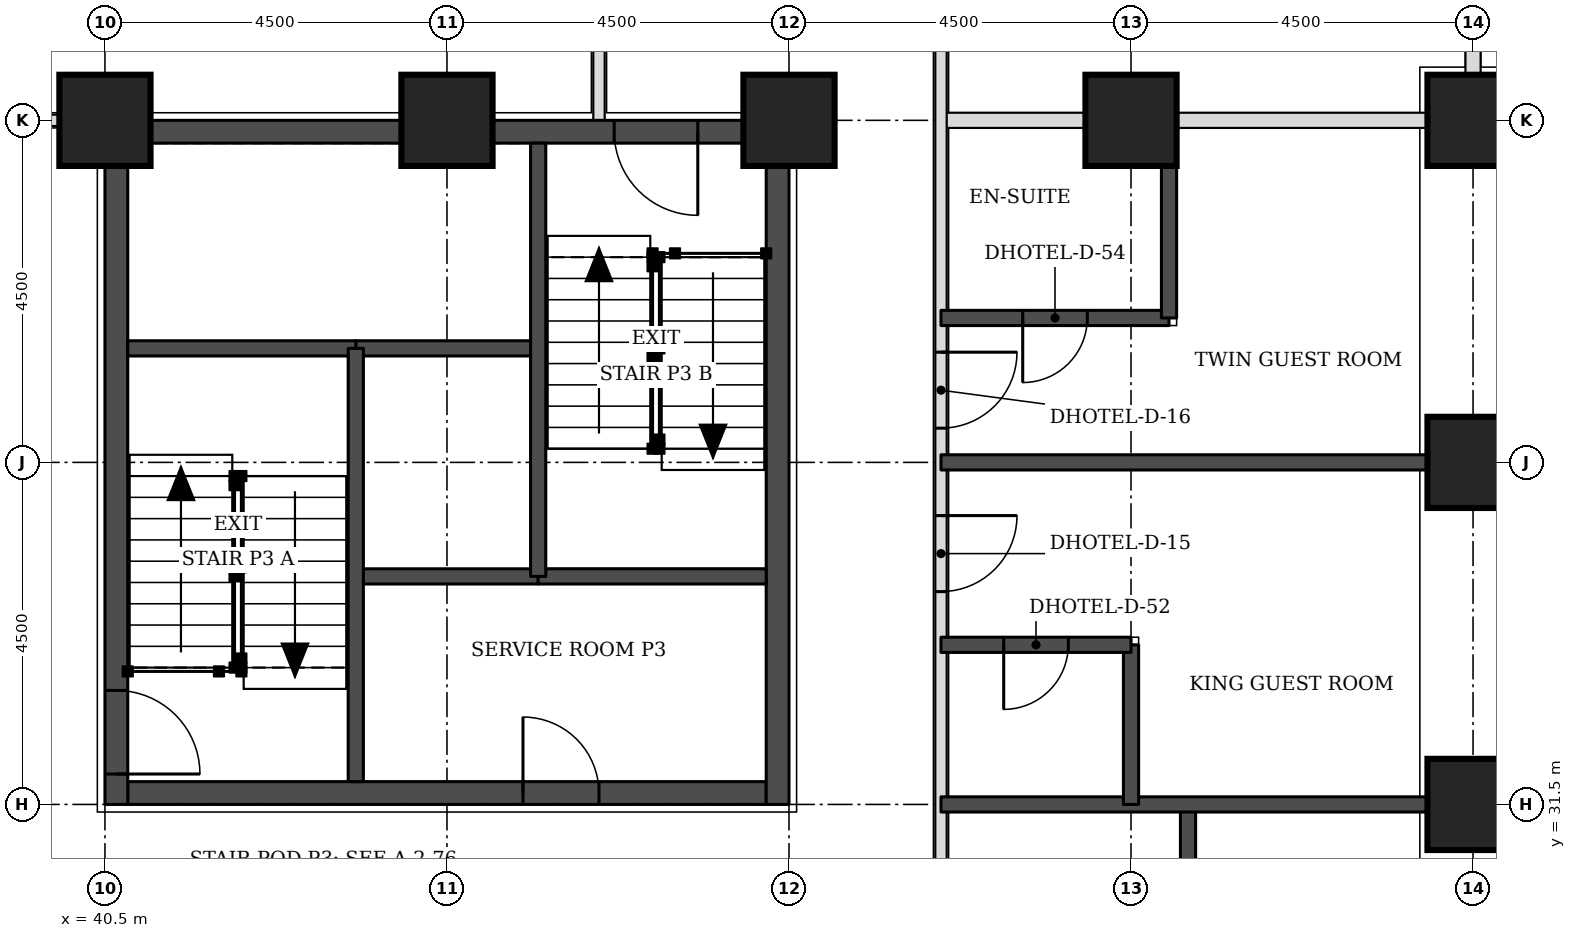
"""IFC4 building model, lengths in metres.
Left out: names, types, materials, properties, quantities, classifications, styles, units other than length and angle.
Written with IfcOpenShell. Run it as: python <this file> out.ifc"""

import sys

from ifc_helpers import new_model, si_unit, direction, frame, frame_2d, origin, origin_2d, place, context, subcontext, project, spatial, rectangle, extrude, element, fill, save


model = new_model("IFC4")
c1 = context("Model", 3, precision=1e-05, world=origin(), true_north=direction((0.0, 1.0)))
c2 = subcontext(c1, "Body", "Model", "MODEL_VIEW")
j1 = project(units=[si_unit("LENGTHUNIT", "METRE"), si_unit("PLANEANGLEUNIT", "RADIAN")], contexts=[c1])
p1 = place(None, origin())
s1 = spatial("IfcSite", under=j1, at=p1, CompositionType="ELEMENT")
p2 = place(p1, origin())
s2 = spatial("IfcBuilding", under=s1, at=p2, CompositionType="ELEMENT")
p3 = place(p2, frame((0.0, 0.0, 36.3)))
s3 = spatial("IfcBuildingStorey", under=s2, at=p3, CompositionType="ELEMENT", Elevation=36.3)
for number, where, z_axis, x_axis in (
    (1, (58.5, 31.5, 0.0), (0.0, 0.0, 1.0), (1.0, 0.0, 0.0)),
    (2, (58.5, 36.0, 0.0), (0.0, 0.0, 1.0), (1.0, 0.0, 0.0)),
    (3, (40.5, 40.5, 0.0), (0.0, 0.0, 1.0), (1.0, 0.0, 0.0)),
    (4, (45.0, 40.5, 0.0), (0.0, 0.0, 1.0), (1.0, 0.0, 0.0)),
    (5, (49.5, 40.5, 0.0), (0.0, 0.0, 1.0), (1.0, 0.0, 0.0)),
    (6, (54.0, 40.5, 0.0), (0.0, 0.0, 1.0), (1.0, 0.0, 0.0)),
    (7, (58.5, 40.5, 0.0), (0.0, 0.0, 1.0), (1.0, 0.0, 0.0)),
):
    element("IfcColumn", number, at=place(p3, frame(where, z_axis=z_axis, x_axis=x_axis)), inside=s3, PredefinedType="COLUMN", context=c2, shape_type="SweptSolid", body=[
        extrude(rectangle(XDim=1.2, YDim=1.2, at=origin_2d()), origin(), (0.0, 0.0, 1.0), 3.3),
    ])
p4 = place(p3, frame((40.8, 31.65, 0.0), z_axis=(0.0, 0.0, 1.0), x_axis=(1.0, 0.0, 0.0)))
e8 = element("IfcWall", 8, at=p4, inside=s3, PredefinedType="SHEAR", context=c2, shape_type="SweptSolid", body=[
    extrude(rectangle(XDim=8.4, YDim=0.3, at=frame_2d((4.2, 0.0))), origin(), (0.0, 0.0, 1.0), 3.3),
])
p5 = place(p4, frame((5.2, 0.0, 0.0)))
e9 = element("IfcOpeningElement", 9, at=p5, cuts=e8, PredefinedType="OPENING", context=c2, shape_type="SweptSolid", body=[
    extrude(rectangle(XDim=1.0, YDim=2.1, at=frame_2d((0.5, 1.05))), frame((0.0, 0.16, 0.0), z_axis=(0.0, -1.0, 0.0), x_axis=(1.0, 0.0, 0.0)), (0.0, 0.0, 1.0), 0.32),
])
p6 = place(p3, frame((40.8, 40.35, 0.0), z_axis=(0.0, 0.0, 1.0), x_axis=(1.0, 0.0, 0.0)))
e10 = element("IfcWall", 10, at=p6, inside=s3, PredefinedType="SHEAR", context=c2, shape_type="SweptSolid", body=[
    extrude(rectangle(XDim=8.4, YDim=0.3, at=frame_2d((4.2, 0.0))), origin(), (0.0, 0.0, 1.0), 3.3),
])
p7 = place(p6, frame((6.4, 0.0, 0.0)))
e11 = element("IfcOpeningElement", 11, at=p7, cuts=e10, PredefinedType="OPENING", context=c2, shape_type="SweptSolid", body=[
    extrude(rectangle(XDim=1.1, YDim=2.1, at=frame_2d((0.55, 1.05))), frame((0.0, 0.16, 0.0), z_axis=(0.0, -1.0, 0.0), x_axis=(1.0, 0.0, 0.0)), (0.0, 0.0, 1.0), 0.32),
])
p8 = place(p3, frame((40.65, 31.5, 0.0), z_axis=(0.0, 0.0, 1.0), x_axis=(0.0, 1.0, 0.0)))
e12 = element("IfcWall", 12, at=p8, inside=s3, PredefinedType="SHEAR", context=c2, shape_type="SweptSolid", body=[
    extrude(rectangle(XDim=9.0, YDim=0.3, at=frame_2d((4.5, 0.0))), origin(), (0.0, 0.0, 1.0), 3.3),
])
p9 = place(p8, frame((0.4, 0.0, 0.0)))
e13 = element("IfcOpeningElement", 13, at=p9, cuts=e12, PredefinedType="OPENING", context=c2, shape_type="SweptSolid", body=[
    extrude(rectangle(XDim=1.1, YDim=2.1, at=frame_2d((0.55, 1.05))), frame((0.0, 0.16, 0.0), z_axis=(0.0, -1.0, 0.0), x_axis=(1.0, 0.0, 0.0)), (0.0, 0.0, 1.0), 0.32),
])
p10 = place(p3, frame((49.35, 31.5, 0.0), z_axis=(0.0, 0.0, 1.0), x_axis=(0.0, 1.0, 0.0)))
e14 = element("IfcWall", 14, at=p10, inside=s3, PredefinedType="SHEAR", context=c2, shape_type="SweptSolid", body=[
    extrude(rectangle(XDim=9.0, YDim=0.3, at=frame_2d((4.5, 0.0))), origin(), (0.0, 0.0, 1.0), 3.3),
])
p11 = place(p3, frame((51.5, 40.5, 0.0), z_axis=(0.0, 0.0, 1.0), x_axis=(1.0, 0.0, 0.0)))
e15 = element("IfcWall", 15, at=p11, inside=s3, PredefinedType="PARTITIONING", context=c2, shape_type="SweptSolid", body=[
    extrude(rectangle(XDim=6.4, YDim=0.2, at=frame_2d((3.2, 0.0))), origin(), (0.0, 0.0, 1.0), 2.33),
])
p12 = place(p3, frame((58.5, 41.1, 0.0), z_axis=(0.0, 0.0, 1.0), x_axis=(0.0, 1.0, 0.0)))
e16 = element("IfcWall", 16, at=p12, inside=s3, PredefinedType="PARTITIONING", context=c2, shape_type="SweptSolid", body=[
    extrude(rectangle(XDim=6.4, YDim=0.2, at=frame_2d((3.2, 0.0))), origin(), (0.0, 0.0, 1.0), 3.08),
])
p13 = place(p3, frame((51.5, 25.15, 0.0), z_axis=(0.0, 0.0, 1.0), x_axis=(0.0, 1.0, 0.0)))
e17 = element("IfcWall", 17, at=p13, inside=s3, PredefinedType="PARTITIONING", context=c2, shape_type="SweptSolid", body=[
    extrude(rectangle(XDim=22.35, YDim=0.15, at=frame_2d((11.175, 0.0))), origin(), (0.0, 0.0, 1.0), 3.08),
])
p14 = place(p13, frame((0.347, 0.0, 0.0)))
e18 = element("IfcOpeningElement", 18, at=p14, cuts=e17, PredefinedType="OPENING", context=c2, shape_type="SweptSolid", body=[
    extrude(rectangle(XDim=1.0, YDim=2.1, at=frame_2d((0.5, 1.05))), frame((0.0, 0.085, 0.0), z_axis=(0.0, -1.0, 0.0), x_axis=(1.0, 0.0, 0.0)), (0.0, 0.0, 1.0), 0.17),
])
p15 = place(p13, frame((2.3, 0.0, 0.0)))
e19 = element("IfcOpeningElement", 19, at=p15, cuts=e17, PredefinedType="OPENING", context=c2, shape_type="SweptSolid", body=[
    extrude(rectangle(XDim=1.0, YDim=2.1, at=frame_2d((0.5, 1.05))), frame((0.0, 0.085, 0.0), z_axis=(0.0, -1.0, 0.0), x_axis=(1.0, 0.0, 0.0)), (0.0, 0.0, 1.0), 0.17),
])
p16 = place(p13, frame((9.15, 0.0, 0.0)))
e20 = element("IfcOpeningElement", 20, at=p16, cuts=e17, PredefinedType="OPENING", context=c2, shape_type="SweptSolid", body=[
    extrude(rectangle(XDim=1.0, YDim=2.1, at=frame_2d((0.5, 1.05))), frame((0.0, 0.085, 0.0), z_axis=(0.0, -1.0, 0.0), x_axis=(1.0, 0.0, 0.0)), (0.0, 0.0, 1.0), 0.17),
])
p17 = place(p13, frame((11.3, 0.0, 0.0)))
e21 = element("IfcOpeningElement", 21, at=p17, cuts=e17, PredefinedType="OPENING", context=c2, shape_type="SweptSolid", body=[
    extrude(rectangle(XDim=1.0, YDim=2.1, at=frame_2d((0.5, 1.05))), frame((0.0, 0.085, 0.0), z_axis=(0.0, -1.0, 0.0), x_axis=(1.0, 0.0, 0.0)), (0.0, 0.0, 1.0), 0.17),
])
p18 = place(p13, frame((18.4, 0.0, 0.0)))
e22 = element("IfcOpeningElement", 22, at=p18, cuts=e17, PredefinedType="OPENING", context=c2, shape_type="SweptSolid", body=[
    extrude(rectangle(XDim=0.9, YDim=2.1, at=frame_2d((0.45, 1.05))), frame((0.0, 0.085, 0.0), z_axis=(0.0, -1.0, 0.0), x_axis=(1.0, 0.0, 0.0)), (0.0, 0.0, 1.0), 0.17),
])
p19 = place(p3, frame((38.5, 40.5, 0.0), z_axis=(0.0, 0.0, 1.0), x_axis=(1.0, 0.0, 0.0)))
e23 = element("IfcWall", 23, at=p19, inside=s3, PredefinedType="PARTITIONING", context=c2, shape_type="SweptSolid", body=[
    extrude(rectangle(XDim=1.95, YDim=0.15, at=frame_2d((0.975, 0.0))), origin(), (0.0, 0.0, 1.0), 2.33),
])
p20 = place(p3, frame((47.0, 40.5, 0.0), z_axis=(0.0, 0.0, 1.0), x_axis=(0.0, 1.0, 0.0)))
e24 = element("IfcWall", 24, at=p20, inside=s3, PredefinedType="PARTITIONING", context=c2, shape_type="SweptSolid", body=[
    extrude(rectangle(XDim=7.0, YDim=0.15, at=frame_2d((3.5, 0.0))), origin(), (0.0, 0.0, 1.0), 3.08),
])
p21 = place(p20, frame((3.05, 0.0, 0.0)))
e25 = element("IfcOpeningElement", 25, at=p21, cuts=e24, PredefinedType="OPENING", context=c2, shape_type="SweptSolid", body=[
    extrude(rectangle(XDim=0.9, YDim=2.1, at=frame_2d((0.45, 1.05))), frame((0.0, 0.085, 0.0), z_axis=(0.0, -1.0, 0.0), x_axis=(1.0, 0.0, 0.0)), (0.0, 0.0, 1.0), 0.17),
])
p22 = place(p3, frame((54.75, 28.9, 0.0), z_axis=(0.0, 0.0, 1.0), x_axis=(0.0, 1.0, 0.0)))
e26 = element("IfcWall", 26, at=p22, inside=s3, PredefinedType="SOLIDWALL", context=c2, shape_type="SweptSolid", body=[
    extrude(rectangle(XDim=2.6, YDim=0.2, at=frame_2d((1.3, 0.0))), origin(), (0.0, 0.0, 1.0), 3.08),
])
p23 = place(p3, frame((51.5, 31.5, 0.0), z_axis=(0.0, 0.0, 1.0), x_axis=(1.0, 0.0, 0.0)))
e27 = element("IfcWall", 27, at=p23, inside=s3, PredefinedType="SOLIDWALL", context=c2, shape_type="SweptSolid", body=[
    extrude(rectangle(XDim=6.4, YDim=0.2, at=frame_2d((3.2, 0.0))), origin(), (0.0, 0.0, 1.0), 3.08),
])
p24 = place(p3, frame((54.0, 31.5, 0.0), z_axis=(0.0, 0.0, 1.0), x_axis=(0.0, 1.0, 0.0)))
e28 = element("IfcWall", 28, at=p24, inside=s3, PredefinedType="SOLIDWALL", context=c2, shape_type="SweptSolid", body=[
    extrude(rectangle(XDim=2.1, YDim=0.2, at=frame_2d((1.05, 0.0))), origin(), (0.0, 0.0, 1.0), 3.08),
])
p25 = place(p3, frame((51.5, 33.6, 0.0), z_axis=(0.0, 0.0, 1.0), x_axis=(1.0, 0.0, 0.0)))
e29 = element("IfcWall", 29, at=p25, inside=s3, PredefinedType="SOLIDWALL", context=c2, shape_type="SweptSolid", body=[
    extrude(rectangle(XDim=2.5, YDim=0.2, at=frame_2d((1.25, 0.0))), origin(), (0.0, 0.0, 1.0), 3.08),
])
p26 = place(p25, frame((0.825, 0.0, 0.0)))
e30 = element("IfcOpeningElement", 30, at=p26, cuts=e29, PredefinedType="OPENING", context=c2, shape_type="SweptSolid", body=[
    extrude(rectangle(XDim=0.85, YDim=2.1, at=frame_2d((0.425, 1.05))), frame((0.0, 0.11, 0.0), z_axis=(0.0, -1.0, 0.0), x_axis=(1.0, 0.0, 0.0)), (0.0, 0.0, 1.0), 0.22),
])
p27 = place(p3, frame((51.5, 36.0, 0.0), z_axis=(0.0, 0.0, 1.0), x_axis=(1.0, 0.0, 0.0)))
e31 = element("IfcWall", 31, at=p27, inside=s3, PredefinedType="SOLIDWALL", context=c2, shape_type="SweptSolid", body=[
    extrude(rectangle(XDim=6.4, YDim=0.2, at=frame_2d((3.2, 0.0))), origin(), (0.0, 0.0, 1.0), 3.08),
])
p28 = place(p3, frame((51.5, 37.9, 0.0), z_axis=(0.0, 0.0, 1.0), x_axis=(1.0, 0.0, 0.0)))
e32 = element("IfcWall", 32, at=p28, inside=s3, PredefinedType="SOLIDWALL", context=c2, shape_type="SweptSolid", body=[
    extrude(rectangle(XDim=3.0, YDim=0.2, at=frame_2d((1.5, 0.0))), origin(), (0.0, 0.0, 1.0), 3.08),
])
p29 = place(p28, frame((1.075, 0.0, 0.0)))
e33 = element("IfcOpeningElement", 33, at=p29, cuts=e32, PredefinedType="OPENING", context=c2, shape_type="SweptSolid", body=[
    extrude(rectangle(XDim=0.85, YDim=2.1, at=frame_2d((0.425, 1.05))), frame((0.0, 0.11, 0.0), z_axis=(0.0, -1.0, 0.0), x_axis=(1.0, 0.0, 0.0)), (0.0, 0.0, 1.0), 0.22),
])
p30 = place(p3, frame((54.5, 37.9, 0.0), z_axis=(0.0, 0.0, 1.0), x_axis=(0.0, 1.0, 0.0)))
e34 = element("IfcWall", 34, at=p30, inside=s3, PredefinedType="SOLIDWALL", context=c2, shape_type="SweptSolid", body=[
    extrude(rectangle(XDim=2.6, YDim=0.2, at=frame_2d((1.3, 0.0))), origin(), (0.0, 0.0, 1.0), 3.08),
])
p31 = place(p3, frame((43.8, 34.5, 0.0), z_axis=(0.0, 0.0, 1.0), x_axis=(1.0, 0.0, 0.0)))
e35 = element("IfcWall", 35, at=p31, inside=s3, PredefinedType="SOLIDWALL", context=c2, shape_type="SweptSolid", body=[
    extrude(rectangle(XDim=2.4, YDim=0.2, at=frame_2d((1.2, 0.0))), origin(), (0.0, 0.0, 1.0), 3.08),
])
p32 = place(p3, frame((46.2, 34.5, 0.0), z_axis=(0.0, 0.0, 1.0), x_axis=(1.0, 0.0, 0.0)))
e36 = element("IfcWall", 36, at=p32, inside=s3, PredefinedType="SOLIDWALL", context=c2, shape_type="SweptSolid", body=[
    extrude(rectangle(XDim=3.0, YDim=0.2, at=frame_2d((1.5, 0.0))), origin(), (0.0, 0.0, 1.0), 3.08),
])
p33 = place(p3, frame((43.8, 37.5, 0.0), z_axis=(0.0, 0.0, 1.0), x_axis=(1.0, 0.0, 0.0)))
e37 = element("IfcWall", 37, at=p33, inside=s3, PredefinedType="SOLIDWALL", context=c2, shape_type="SweptSolid", body=[
    extrude(rectangle(XDim=2.4, YDim=0.2, at=frame_2d((1.2, 0.0))), origin(), (0.0, 0.0, 1.0), 3.3),
])
p34 = place(p3, frame((40.8, 37.5, 0.0), z_axis=(0.0, 0.0, 1.0), x_axis=(1.0, 0.0, 0.0)))
e38 = element("IfcWall", 38, at=p34, inside=s3, PredefinedType="SOLIDWALL", context=c2, shape_type="SweptSolid", body=[
    extrude(rectangle(XDim=3.0, YDim=0.2, at=frame_2d((1.5, 0.0))), origin(), (0.0, 0.0, 1.0), 3.08),
])
for number, where, z_axis, x_axis in (
    (39, (43.8, 31.8, 0.0), (0.0, 0.0, 1.0), (0.0, 1.0, 0.0)),
    (40, (46.2, 34.5, 0.0), (0.0, 0.0, 1.0), (0.0, 1.0, 0.0)),
):
    element("IfcWall", number, at=place(p3, frame(where, z_axis=z_axis, x_axis=x_axis)), inside=s3, PredefinedType="SOLIDWALL", context=c2, shape_type="SweptSolid", body=[
        extrude(rectangle(XDim=5.7, YDim=0.2, at=frame_2d((2.85, 0.0))), origin(), (0.0, 0.0, 1.0), 3.08),
    ])
p35 = place(p16, frame((1.0, 0.0, 0.0), z_axis=(0.0, 0.0, 1.0), x_axis=(-1.0, 0.0, 0.0)))
e41 = element("IfcDoor", 41, at=p35, inside=s3, OperationType="SINGLE_SWING_LEFT", PredefinedType="DOOR", context=c2, shape_type="SweptSolid", body=[
    extrude(rectangle(XDim=1.0, YDim=2.1, at=frame_2d((0.5, 1.05))), frame((0.0, 0.025, 0.0), z_axis=(0.0, -1.0, 0.0), x_axis=(1.0, 0.0, 0.0)), (0.0, 0.0, 1.0), 0.05),
])
fill(e20, e41)
p36 = place(p26, frame((0.85, 0.0, 0.0), z_axis=(0.0, 0.0, 1.0), x_axis=(-1.0, 0.0, 0.0)))
e42 = element("IfcDoor", 42, at=p36, inside=s3, OperationType="SINGLE_SWING_RIGHT", PredefinedType="DOOR", context=c2, shape_type="SweptSolid", body=[
    extrude(rectangle(XDim=0.85, YDim=2.1, at=frame_2d((0.425, 1.05))), frame((0.0, 0.025, 0.0), z_axis=(0.0, -1.0, 0.0), x_axis=(1.0, 0.0, 0.0)), (0.0, 0.0, 1.0), 0.05),
])
fill(e30, e42)
p37 = place(p17, frame((1.0, 0.0, 0.0), z_axis=(0.0, 0.0, 1.0), x_axis=(-1.0, 0.0, 0.0)))
e43 = element("IfcDoor", 43, at=p37, inside=s3, OperationType="SINGLE_SWING_LEFT", PredefinedType="DOOR", context=c2, shape_type="SweptSolid", body=[
    extrude(rectangle(XDim=1.0, YDim=2.1, at=frame_2d((0.5, 1.05))), frame((0.0, 0.025, 0.0), z_axis=(0.0, -1.0, 0.0), x_axis=(1.0, 0.0, 0.0)), (0.0, 0.0, 1.0), 0.05),
])
fill(e21, e43)
p38 = place(p29, frame((0.85, 0.0, 0.0), z_axis=(0.0, 0.0, 1.0), x_axis=(-1.0, 0.0, 0.0)))
e44 = element("IfcDoor", 44, at=p38, inside=s3, OperationType="SINGLE_SWING_RIGHT", PredefinedType="DOOR", context=c2, shape_type="SweptSolid", body=[
    extrude(rectangle(XDim=0.85, YDim=2.1, at=frame_2d((0.425, 1.05))), frame((0.0, 0.025, 0.0), z_axis=(0.0, -1.0, 0.0), x_axis=(1.0, 0.0, 0.0)), (0.0, 0.0, 1.0), 0.05),
])
fill(e33, e44)
p39 = place(p9, frame((1.1, 0.0, 0.0), z_axis=(0.0, 0.0, 1.0), x_axis=(-1.0, 0.0, 0.0)))
e45 = element("IfcDoor", 45, at=p39, inside=s3, OperationType="SINGLE_SWING_RIGHT", PredefinedType="DOOR", context=c2, shape_type="SweptSolid", body=[
    extrude(rectangle(XDim=1.1, YDim=2.1, at=frame_2d((0.55, 1.05))), frame((0.0, 0.025, 0.0), z_axis=(0.0, -1.0, 0.0), x_axis=(1.0, 0.0, 0.0)), (0.0, 0.0, 1.0), 0.05),
])
fill(e13, e45)
p40 = place(p7, frame((1.1, 0.0, 0.0), z_axis=(0.0, 0.0, 1.0), x_axis=(-1.0, 0.0, 0.0)))
e46 = element("IfcDoor", 46, at=p40, inside=s3, OperationType="SINGLE_SWING_LEFT", PredefinedType="DOOR", context=c2, shape_type="SweptSolid", body=[
    extrude(rectangle(XDim=1.1, YDim=2.1, at=frame_2d((0.55, 1.05))), frame((0.0, 0.025, 0.0), z_axis=(0.0, -1.0, 0.0), x_axis=(1.0, 0.0, 0.0)), (0.0, 0.0, 1.0), 0.05),
])
fill(e11, e46)
p41 = place(p5, origin())
e47 = element("IfcDoor", 47, at=p41, inside=s3, OperationType="SINGLE_SWING_LEFT", PredefinedType="DOOR", context=c2, shape_type="SweptSolid", body=[
    extrude(rectangle(XDim=1.0, YDim=2.1, at=frame_2d((0.5, 1.05))), frame((0.0, 0.025, 0.0), z_axis=(0.0, -1.0, 0.0), x_axis=(1.0, 0.0, 0.0)), (0.0, 0.0, 1.0), 0.05),
])
fill(e9, e47)
save(model, sys.argv[1])
